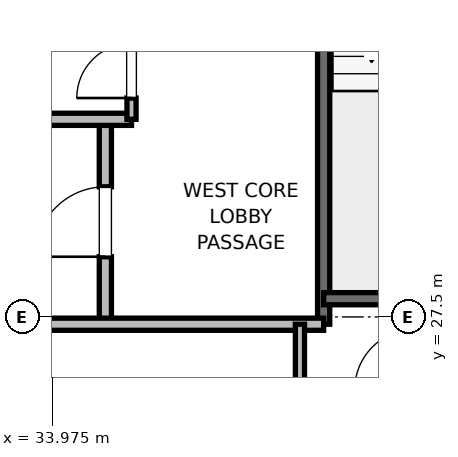
"""IFC4 building model, lengths in metres.
Left out: names, types, materials, properties, quantities, classifications, styles, units other than length and angle.
Written with IfcOpenShell. Run it as: python <this file> out.ifc"""

import sys

from ifc_helpers import new_model, si_unit, direction, frame, frame_2d, origin, place, context, subcontext, project, spatial, rectangle, extrude, element, fill, save


model = new_model("IFC4")
c1 = context("Model", 3, precision=1e-05, world=origin(), true_north=direction((0.0, 1.0)))
c2 = subcontext(c1, "Body", "Model", "MODEL_VIEW")
j1 = project(units=[si_unit("LENGTHUNIT", "METRE"), si_unit("PLANEANGLEUNIT", "RADIAN")], contexts=[c1])
p1 = place(None, origin())
s1 = spatial("IfcSite", under=j1, at=p1, CompositionType="ELEMENT")
p2 = place(p1, origin())
s2 = spatial("IfcBuilding", under=s1, at=p2, CompositionType="ELEMENT")
p3 = place(p2, frame((0.0, 0.0, 136.4)))
s3 = spatial("IfcBuildingStorey", under=s2, at=p3, CompositionType="ELEMENT", Elevation=136.4)
p4 = place(p3, frame((38.44, 27.38, 0.0), z_axis=(0.0, 0.0, 1.0), x_axis=(0.0, 1.0, 0.0)))
e1 = element("IfcWall", 1, at=p4, inside=s3, PredefinedType="SOLIDWALL", context=c2, shape_type="SweptSolid", body=[
    extrude(rectangle(XDim=8.87, YDim=0.2, at=frame_2d((4.435, 0.0))), origin(), (0.0, 0.0, 1.0), 3.775),
])
p5 = place(p3, frame((38.44, 27.8, 0.0), z_axis=(0.0, 0.0, 1.0), x_axis=(1.0, 0.0, 0.0)))
e2 = element("IfcWall", 2, at=p5, inside=s3, PredefinedType="SOLIDWALL", context=c2, shape_type="SweptSolid", body=[
    extrude(rectangle(XDim=3.32, YDim=0.2, at=frame_2d((1.66, 0.0))), origin(), (0.0, 0.0, 1.0), 3.775),
])
p6 = place(p3, frame((34.85, 27.38, 0.0), z_axis=(0.0, 0.0, 1.0), x_axis=(0.0, 1.0, 0.0)))
e3 = element("IfcWall", 3, at=p6, inside=s3, PredefinedType="PARTITIONING", context=c2, shape_type="SweptSolid", body=[
    extrude(rectangle(XDim=3.37, YDim=0.2, at=frame_2d((1.685, 0.0))), origin(), (0.0, 0.0, 1.0), 3.775),
])
p7 = place(p6, frame((1.11, 0.0, 0.0)))
e4 = element("IfcOpeningElement", 4, at=p7, cuts=e3, PredefinedType="OPENING", context=c2, shape_type="SweptSolid", body=[
    extrude(rectangle(XDim=1.15, YDim=2.2, at=frame_2d((0.575, 1.1))), frame((0.0, 0.1, 0.0), z_axis=(0.0, -1.0, 0.0), x_axis=(1.0, 0.0, 0.0)), (0.0, 0.0, 1.0), 0.2),
])
p8 = place(p3, frame((32.82, 27.38, 0.0), z_axis=(0.0, 0.0, 1.0), x_axis=(1.0, 0.0, 0.0)))
e5 = element("IfcWall", 5, at=p8, inside=s3, PredefinedType="PARTITIONING", context=c2, shape_type="SweptSolid", body=[
    extrude(rectangle(XDim=5.62, YDim=0.2, at=frame_2d((2.81, 0.0))), origin(), (0.0, 0.0, 1.0), 3.775),
])
p9 = place(p3, frame((32.15, 30.75, 0.0), z_axis=(0.0, 0.0, 1.0), x_axis=(1.0, 0.0, 0.0)))
e6 = element("IfcWall", 6, at=p9, inside=s3, PredefinedType="PARTITIONING", context=c2, shape_type="SweptSolid", body=[
    extrude(rectangle(XDim=3.13, YDim=0.2, at=frame_2d((1.565, 0.0))), origin(), (0.0, 0.0, 1.0), 3.775),
])
p10 = place(p3, frame((35.28, 30.75, 0.0), z_axis=(0.0, 0.0, 1.0), x_axis=(0.0, 1.0, 0.0)))
e7 = element("IfcWall", 7, at=p10, inside=s3, PredefinedType="PARTITIONING", context=c2, shape_type="SweptSolid", body=[
    extrude(rectangle(XDim=1.6, YDim=0.15, at=frame_2d((0.8, 0.0))), origin(), (0.0, 0.0, 1.0), 2.85),
])
p11 = place(p10, frame((0.35, 0.0, 0.0)))
e8 = element("IfcOpeningElement", 8, at=p11, cuts=e7, PredefinedType="OPENING", context=c2, shape_type="SweptSolid", body=[
    extrude(rectangle(XDim=0.9, YDim=2.1, at=frame_2d((0.45, 1.05))), frame((0.0, 0.075, 0.0), z_axis=(0.0, -1.0, 0.0), x_axis=(1.0, 0.0, 0.0)), (0.0, 0.0, 1.0), 0.15),
])
p12 = place(p3, frame((38.05, 24.5, 0.0), z_axis=(0.0, 0.0, 1.0), x_axis=(0.0, 1.0, 0.0)))
e9 = element("IfcWall", 9, at=p12, inside=s3, PredefinedType="PARTITIONING", context=c2, shape_type="SweptSolid", body=[
    extrude(rectangle(XDim=2.88, YDim=0.15, at=frame_2d((1.44, 0.0))), origin(), (0.0, 0.0, 1.0), 2.85),
])
p13 = place(p12, frame((0.94, 0.0, 0.0)))
e10 = element("IfcOpeningElement", 10, at=p13, cuts=e9, PredefinedType="OPENING", context=c2, shape_type="SweptSolid", body=[
    extrude(rectangle(XDim=1.0, YDim=2.15, at=frame_2d((0.5, 1.075))), frame((0.0, 0.075, 0.0), z_axis=(0.0, -1.0, 0.0), x_axis=(1.0, 0.0, 0.0)), (0.0, 0.0, 1.0), 0.15),
])
p14 = place(p7, origin())
e11 = element("IfcDoor", 11, at=p14, inside=s3, OperationType="SINGLE_SWING_LEFT", PredefinedType="DOOR", context=c2, shape_type="SweptSolid", body=[
    extrude(rectangle(XDim=1.15, YDim=2.2, at=frame_2d((0.575, 1.1))), frame((0.0, 0.025, 0.0), z_axis=(0.0, -1.0, 0.0), x_axis=(1.0, 0.0, 0.0)), (0.0, 0.0, 1.0), 0.05),
])
fill(e4, e11)
p15 = place(p11, origin())
e12 = element("IfcDoor", 12, at=p15, inside=s3, OperationType="SINGLE_SWING_LEFT", PredefinedType="DOOR", context=c2, shape_type="SweptSolid", body=[
    extrude(rectangle(XDim=0.9, YDim=2.1, at=frame_2d((0.45, 1.05))), frame((0.0, 0.025, 0.0), z_axis=(0.0, -1.0, 0.0), x_axis=(1.0, 0.0, 0.0)), (0.0, 0.0, 1.0), 0.05),
])
fill(e8, e12)
save(model, sys.argv[1])
